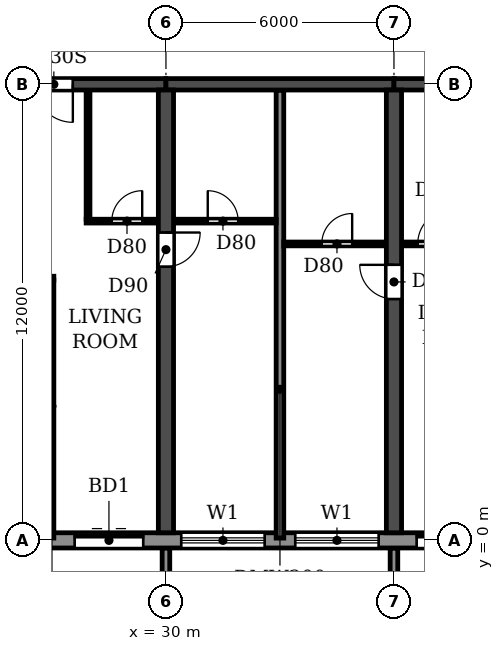
"""IFC4 building model, lengths in metres.
Left out: names, types, materials, properties, quantities, classifications, styles, units other than length and angle.
Written with IfcOpenShell. Run it as: python <this file> out.ifc"""

import sys

from ifc_helpers import new_model, si_unit, direction, frame, frame_2d, origin, place, context, subcontext, project, spatial, polyline, rectangle, outline, extrude, source, transform, mapped, element, fill, save


model = new_model("IFC4")
c1 = context("Model", 3, precision=1e-05, world=origin(), true_north=direction((0.0, 1.0)))
c2 = subcontext(c1, "Body", "Model", "MODEL_VIEW")
j1 = project(units=[si_unit("LENGTHUNIT", "METRE"), si_unit("PLANEANGLEUNIT", "RADIAN")], contexts=[c1])
p1 = place(None, origin())
s1 = spatial("IfcSite", under=j1, at=p1, CompositionType="ELEMENT")
p2 = place(p1, origin())
s2 = spatial("IfcBuilding", under=s1, at=p2, CompositionType="ELEMENT")
p3 = place(p2, frame((0.0, 0.0, 56.4)))
s3 = spatial("IfcBuildingStorey", under=s2, at=p3, CompositionType="ELEMENT", Elevation=56.4)
p4 = place(p3, frame((30.0, 0.2, 0.0), z_axis=(0.0, 0.0, 1.0), x_axis=(0.0, 1.0, 0.0)))
e1 = element("IfcWall", 1, at=p4, inside=s3, PredefinedType="SHEAR", context=c2, shape_type="SweptSolid", body=[
    extrude(rectangle(XDim=11.65, YDim=0.4, at=frame_2d((5.825, 0.0))), origin(), (0.0, 0.0, 1.0), 3.05),
])
p5 = place(p4, frame((7.0, 0.0, 0.0)))
e2 = element("IfcOpeningElement", 2, at=p5, cuts=e1, PredefinedType="OPENING", context=c2, shape_type="SweptSolid", body=[
    extrude(rectangle(XDim=0.9, YDim=2.1, at=frame_2d((0.45, 1.05))), frame((0.0, 0.21, 0.0), z_axis=(0.0, -1.0, 0.0), x_axis=(1.0, 0.0, 0.0)), (0.0, 0.0, 1.0), 0.42),
])
p6 = place(p3, frame((36.0, 0.2, 0.0), z_axis=(0.0, 0.0, 1.0), x_axis=(0.0, 1.0, 0.0)))
e3 = element("IfcWall", 3, at=p6, inside=s3, PredefinedType="SHEAR", context=c2, shape_type="SweptSolid", body=[
    extrude(rectangle(XDim=11.65, YDim=0.4, at=frame_2d((5.825, 0.0))), origin(), (0.0, 0.0, 1.0), 3.05),
])
p7 = place(p6, frame((6.15, 0.0, 0.0)))
e4 = element("IfcOpeningElement", 4, at=p7, cuts=e3, PredefinedType="OPENING", context=c2, shape_type="SweptSolid", body=[
    extrude(rectangle(XDim=0.9, YDim=2.1, at=frame_2d((0.45, 1.05))), frame((0.0, 0.21, 0.0), z_axis=(0.0, -1.0, 0.0), x_axis=(1.0, 0.0, 0.0)), (0.0, 0.0, 1.0), 0.42),
])
p8 = place(p3, frame((24.0, 12.0, 0.0), z_axis=(0.0, 0.0, 1.0), x_axis=(1.0, 0.0, 0.0)))
e5 = element("IfcWall", 5, at=p8, inside=s3, PredefinedType="SHEAR", context=c2, shape_type="SweptSolid", body=[
    extrude(rectangle(XDim=6.0, YDim=0.3, at=frame_2d((3.0, 0.0))), origin(), (0.0, 0.0, 1.0), 2.45),
])
p9 = place(p8, frame((2.55, 0.0, 0.0)))
e6 = element("IfcOpeningElement", 6, at=p9, cuts=e5, PredefinedType="OPENING", context=c2, shape_type="SweptSolid", body=[
    extrude(rectangle(XDim=1.0, YDim=2.1, at=frame_2d((0.5, 1.05))), frame((0.0, 0.16, 0.0), z_axis=(0.0, -1.0, 0.0), x_axis=(1.0, 0.0, 0.0)), (0.0, 0.0, 1.0), 0.32),
])
p10 = place(p3, frame((30.0, 12.0, 0.0), z_axis=(0.0, 0.0, 1.0), x_axis=(1.0, 0.0, 0.0)))
e7 = element("IfcWall", 7, at=p10, inside=s3, PredefinedType="SHEAR", context=c2, shape_type="SweptSolid", body=[
    extrude(rectangle(XDim=6.0, YDim=0.3, at=frame_2d((3.0, 0.0))), origin(), (0.0, 0.0, 1.0), 2.45),
])
p11 = place(p3, frame((36.0, 12.0, 0.0), z_axis=(0.0, 0.0, 1.0), x_axis=(1.0, 0.0, 0.0)))
e8 = element("IfcWall", 8, at=p11, inside=s3, PredefinedType="SHEAR", context=c2, shape_type="SweptSolid", body=[
    extrude(rectangle(XDim=6.0, YDim=0.3, at=frame_2d((3.0, 0.0))), origin(), (0.0, 0.0, 1.0), 2.45),
])
p12 = place(p11, frame((2.55, 0.0, 0.0)))
e9 = element("IfcOpeningElement", 9, at=p12, cuts=e8, PredefinedType="OPENING", context=c2, shape_type="SweptSolid", body=[
    extrude(rectangle(XDim=1.0, YDim=2.1, at=frame_2d((0.5, 1.05))), frame((0.0, 0.16, 0.0), z_axis=(0.0, -1.0, 0.0), x_axis=(1.0, 0.0, 0.0)), (0.0, 0.0, 1.0), 0.32),
])
p13 = place(p3, frame((10.683, 0.0, 0.0), z_axis=(0.0, 0.0, 1.0), x_axis=(1.0, 0.0, 0.0)))
e10 = element("IfcWall", 10, at=p13, inside=s3, PredefinedType="STANDARD", context=c2, shape_type="SweptSolid", body=[
    extrude(rectangle(XDim=80.634, YDim=0.4, at=frame_2d((40.317, 0.0))), origin(), (0.0, 0.0, 1.0), 3.05),
])
p14 = place(p13, frame((1.717, 0.0, 0.9)))
e11 = element("IfcOpeningElement", 11, at=p14, cuts=e10, PredefinedType="OPENING", context=c2, shape_type="SweptSolid", body=[
    extrude(rectangle(XDim=2.2, YDim=1.5, at=frame_2d((1.1, 0.75))), frame((0.0, 0.21, 0.0), z_axis=(0.0, -1.0, 0.0), x_axis=(1.0, 0.0, 0.0)), (0.0, 0.0, 1.0), 0.42),
])
p15 = place(p13, frame((4.917, 0.0, 0.0)))
e12 = element("IfcOpeningElement", 12, at=p15, cuts=e10, PredefinedType="OPENING", context=c2, shape_type="SweptSolid", body=[
    extrude(rectangle(XDim=1.8, YDim=2.4, at=frame_2d((0.9, 1.2))), frame((0.0, 0.21, 0.0), z_axis=(0.0, -1.0, 0.0), x_axis=(1.0, 0.0, 0.0)), (0.0, 0.0, 1.0), 0.42),
])
p16 = place(p13, frame((7.717, 0.0, 0.9)))
e13 = element("IfcOpeningElement", 13, at=p16, cuts=e10, PredefinedType="OPENING", context=c2, shape_type="SweptSolid", body=[
    extrude(rectangle(XDim=2.2, YDim=1.5, at=frame_2d((1.1, 0.75))), frame((0.0, 0.21, 0.0), z_axis=(0.0, -1.0, 0.0), x_axis=(1.0, 0.0, 0.0)), (0.0, 0.0, 1.0), 0.42),
])
p17 = place(p13, frame((10.717, 0.0, 0.9)))
e14 = element("IfcOpeningElement", 14, at=p17, cuts=e10, PredefinedType="OPENING", context=c2, shape_type="SweptSolid", body=[
    extrude(rectangle(XDim=2.2, YDim=1.5, at=frame_2d((1.1, 0.75))), frame((0.0, 0.21, 0.0), z_axis=(0.0, -1.0, 0.0), x_axis=(1.0, 0.0, 0.0)), (0.0, 0.0, 1.0), 0.42),
])
p18 = place(p13, frame((13.717, 0.0, 0.9)))
e15 = element("IfcOpeningElement", 15, at=p18, cuts=e10, PredefinedType="OPENING", context=c2, shape_type="SweptSolid", body=[
    extrude(rectangle(XDim=2.2, YDim=1.5, at=frame_2d((1.1, 0.75))), frame((0.0, 0.21, 0.0), z_axis=(0.0, -1.0, 0.0), x_axis=(1.0, 0.0, 0.0)), (0.0, 0.0, 1.0), 0.42),
])
p19 = place(p13, frame((16.917, 0.0, 0.0)))
e16 = element("IfcOpeningElement", 16, at=p19, cuts=e10, PredefinedType="OPENING", context=c2, shape_type="SweptSolid", body=[
    extrude(rectangle(XDim=1.8, YDim=2.4, at=frame_2d((0.9, 1.2))), frame((0.0, 0.21, 0.0), z_axis=(0.0, -1.0, 0.0), x_axis=(1.0, 0.0, 0.0)), (0.0, 0.0, 1.0), 0.42),
])
p20 = place(p13, frame((19.717, 0.0, 0.9)))
e17 = element("IfcOpeningElement", 17, at=p20, cuts=e10, PredefinedType="OPENING", context=c2, shape_type="SweptSolid", body=[
    extrude(rectangle(XDim=2.2, YDim=1.5, at=frame_2d((1.1, 0.75))), frame((0.0, 0.21, 0.0), z_axis=(0.0, -1.0, 0.0), x_axis=(1.0, 0.0, 0.0)), (0.0, 0.0, 1.0), 0.42),
])
p21 = place(p13, frame((22.717, 0.0, 0.9)))
e18 = element("IfcOpeningElement", 18, at=p21, cuts=e10, PredefinedType="OPENING", context=c2, shape_type="SweptSolid", body=[
    extrude(rectangle(XDim=2.2, YDim=1.5, at=frame_2d((1.1, 0.75))), frame((0.0, 0.21, 0.0), z_axis=(0.0, -1.0, 0.0), x_axis=(1.0, 0.0, 0.0)), (0.0, 0.0, 1.0), 0.42),
])
p22 = place(p13, frame((25.917, 0.0, 0.0)))
e19 = element("IfcOpeningElement", 19, at=p22, cuts=e10, PredefinedType="OPENING", context=c2, shape_type="SweptSolid", body=[
    extrude(rectangle(XDim=1.8, YDim=2.4, at=frame_2d((0.9, 1.2))), frame((0.0, 0.21, 0.0), z_axis=(0.0, -1.0, 0.0), x_axis=(1.0, 0.0, 0.0)), (0.0, 0.0, 1.0), 0.42),
])
p23 = place(p13, frame((28.717, 0.0, 0.9)))
e20 = element("IfcOpeningElement", 20, at=p23, cuts=e10, PredefinedType="OPENING", context=c2, shape_type="SweptSolid", body=[
    extrude(rectangle(XDim=2.2, YDim=1.5, at=frame_2d((1.1, 0.75))), frame((0.0, 0.21, 0.0), z_axis=(0.0, -1.0, 0.0), x_axis=(1.0, 0.0, 0.0)), (0.0, 0.0, 1.0), 0.42),
])
p24 = place(p13, frame((31.717, 0.0, 0.9)))
e21 = element("IfcOpeningElement", 21, at=p24, cuts=e10, PredefinedType="OPENING", context=c2, shape_type="SweptSolid", body=[
    extrude(rectangle(XDim=2.2, YDim=1.5, at=frame_2d((1.1, 0.75))), frame((0.0, 0.21, 0.0), z_axis=(0.0, -1.0, 0.0), x_axis=(1.0, 0.0, 0.0)), (0.0, 0.0, 1.0), 0.42),
])
p25 = place(p13, frame((34.717, 0.0, 0.9)))
e22 = element("IfcOpeningElement", 22, at=p25, cuts=e10, PredefinedType="OPENING", context=c2, shape_type="SweptSolid", body=[
    extrude(rectangle(XDim=2.2, YDim=1.5, at=frame_2d((1.1, 0.75))), frame((0.0, 0.21, 0.0), z_axis=(0.0, -1.0, 0.0), x_axis=(1.0, 0.0, 0.0)), (0.0, 0.0, 1.0), 0.42),
])
p26 = place(p13, frame((37.717, 0.0, 0.9)))
e23 = element("IfcOpeningElement", 23, at=p26, cuts=e10, PredefinedType="OPENING", context=c2, shape_type="SweptSolid", body=[
    extrude(rectangle(XDim=2.2, YDim=1.5, at=frame_2d((1.1, 0.75))), frame((0.0, 0.21, 0.0), z_axis=(0.0, -1.0, 0.0), x_axis=(1.0, 0.0, 0.0)), (0.0, 0.0, 1.0), 0.42),
])
p27 = place(p13, frame((40.917, 0.0, 0.0)))
e24 = element("IfcOpeningElement", 24, at=p27, cuts=e10, PredefinedType="OPENING", context=c2, shape_type="SweptSolid", body=[
    extrude(rectangle(XDim=1.8, YDim=2.4, at=frame_2d((0.9, 1.2))), frame((0.0, 0.21, 0.0), z_axis=(0.0, -1.0, 0.0), x_axis=(1.0, 0.0, 0.0)), (0.0, 0.0, 1.0), 0.42),
])
p28 = place(p13, frame((43.717, 0.0, 0.9)))
e25 = element("IfcOpeningElement", 25, at=p28, cuts=e10, PredefinedType="OPENING", context=c2, shape_type="SweptSolid", body=[
    extrude(rectangle(XDim=2.2, YDim=1.5, at=frame_2d((1.1, 0.75))), frame((0.0, 0.21, 0.0), z_axis=(0.0, -1.0, 0.0), x_axis=(1.0, 0.0, 0.0)), (0.0, 0.0, 1.0), 0.42),
])
p29 = place(p13, frame((46.717, 0.0, 0.9)))
e26 = element("IfcOpeningElement", 26, at=p29, cuts=e10, PredefinedType="OPENING", context=c2, shape_type="SweptSolid", body=[
    extrude(rectangle(XDim=2.2, YDim=1.5, at=frame_2d((1.1, 0.75))), frame((0.0, 0.21, 0.0), z_axis=(0.0, -1.0, 0.0), x_axis=(1.0, 0.0, 0.0)), (0.0, 0.0, 1.0), 0.42),
])
p30 = place(p13, frame((49.717, 0.0, 0.9)))
e27 = element("IfcOpeningElement", 27, at=p30, cuts=e10, PredefinedType="OPENING", context=c2, shape_type="SweptSolid", body=[
    extrude(rectangle(XDim=2.2, YDim=1.5, at=frame_2d((1.1, 0.75))), frame((0.0, 0.21, 0.0), z_axis=(0.0, -1.0, 0.0), x_axis=(1.0, 0.0, 0.0)), (0.0, 0.0, 1.0), 0.42),
])
p31 = place(p13, frame((52.717, 0.0, 0.9)))
e28 = element("IfcOpeningElement", 28, at=p31, cuts=e10, PredefinedType="OPENING", context=c2, shape_type="SweptSolid", body=[
    extrude(rectangle(XDim=2.2, YDim=1.5, at=frame_2d((1.1, 0.75))), frame((0.0, 0.21, 0.0), z_axis=(0.0, -1.0, 0.0), x_axis=(1.0, 0.0, 0.0)), (0.0, 0.0, 1.0), 0.42),
])
p32 = place(p13, frame((55.717, 0.0, 0.9)))
e29 = element("IfcOpeningElement", 29, at=p32, cuts=e10, PredefinedType="OPENING", context=c2, shape_type="SweptSolid", body=[
    extrude(rectangle(XDim=2.2, YDim=1.5, at=frame_2d((1.1, 0.75))), frame((0.0, 0.21, 0.0), z_axis=(0.0, -1.0, 0.0), x_axis=(1.0, 0.0, 0.0)), (0.0, 0.0, 1.0), 0.42),
])
p33 = place(p13, frame((58.717, 0.0, 0.9)))
e30 = element("IfcOpeningElement", 30, at=p33, cuts=e10, PredefinedType="OPENING", context=c2, shape_type="SweptSolid", body=[
    extrude(rectangle(XDim=2.2, YDim=1.5, at=frame_2d((1.1, 0.75))), frame((0.0, 0.21, 0.0), z_axis=(0.0, -1.0, 0.0), x_axis=(1.0, 0.0, 0.0)), (0.0, 0.0, 1.0), 0.42),
])
p34 = place(p13, frame((61.717, 0.0, 0.9)))
e31 = element("IfcOpeningElement", 31, at=p34, cuts=e10, PredefinedType="OPENING", context=c2, shape_type="SweptSolid", body=[
    extrude(rectangle(XDim=2.2, YDim=1.5, at=frame_2d((1.1, 0.75))), frame((0.0, 0.21, 0.0), z_axis=(0.0, -1.0, 0.0), x_axis=(1.0, 0.0, 0.0)), (0.0, 0.0, 1.0), 0.42),
])
p35 = place(p13, frame((64.917, 0.0, 0.0)))
e32 = element("IfcOpeningElement", 32, at=p35, cuts=e10, PredefinedType="OPENING", context=c2, shape_type="SweptSolid", body=[
    extrude(rectangle(XDim=1.8, YDim=2.4, at=frame_2d((0.9, 1.2))), frame((0.0, 0.21, 0.0), z_axis=(0.0, -1.0, 0.0), x_axis=(1.0, 0.0, 0.0)), (0.0, 0.0, 1.0), 0.42),
])
p36 = place(p13, frame((67.717, 0.0, 0.9)))
e33 = element("IfcOpeningElement", 33, at=p36, cuts=e10, PredefinedType="OPENING", context=c2, shape_type="SweptSolid", body=[
    extrude(rectangle(XDim=2.2, YDim=1.5, at=frame_2d((1.1, 0.75))), frame((0.0, 0.21, 0.0), z_axis=(0.0, -1.0, 0.0), x_axis=(1.0, 0.0, 0.0)), (0.0, 0.0, 1.0), 0.42),
])
p37 = place(p13, frame((70.717, 0.0, 0.9)))
e34 = element("IfcOpeningElement", 34, at=p37, cuts=e10, PredefinedType="OPENING", context=c2, shape_type="SweptSolid", body=[
    extrude(rectangle(XDim=2.2, YDim=1.5, at=frame_2d((1.1, 0.75))), frame((0.0, 0.21, 0.0), z_axis=(0.0, -1.0, 0.0), x_axis=(1.0, 0.0, 0.0)), (0.0, 0.0, 1.0), 0.42),
])
p38 = place(p13, frame((73.717, 0.0, 0.9)))
e35 = element("IfcOpeningElement", 35, at=p38, cuts=e10, PredefinedType="OPENING", context=c2, shape_type="SweptSolid", body=[
    extrude(rectangle(XDim=2.2, YDim=1.5, at=frame_2d((1.1, 0.75))), frame((0.0, 0.21, 0.0), z_axis=(0.0, -1.0, 0.0), x_axis=(1.0, 0.0, 0.0)), (0.0, 0.0, 1.0), 0.42),
])
p39 = place(p13, frame((76.917, 0.0, 0.0)))
e36 = element("IfcOpeningElement", 36, at=p39, cuts=e10, PredefinedType="OPENING", context=c2, shape_type="SweptSolid", body=[
    extrude(rectangle(XDim=1.8, YDim=2.4, at=frame_2d((0.9, 1.2))), frame((0.0, 0.21, 0.0), z_axis=(0.0, -1.0, 0.0), x_axis=(1.0, 0.0, 0.0)), (0.0, 0.0, 1.0), 0.42),
])
m1 = source(origin(), c2, "Body", "SweptSolid", [
    extrude(outline(polyline([(0.0, 0.0), (0.2, 0.0), (0.2, 1.65), (0.0, 1.65), (0.0, 0.0)])), origin(), (0.0, 0.0, 1.0), 3.1),
])
for number, where in (
    (37, (29.9, -1.85, 0.0)),
    (38, (35.9, -1.85, 0.0)),
):
    element("IfcWall", number, at=place(p3, frame(where)), inside=s3, PredefinedType="STANDARD", context=c2, shape_type="MappedRepresentation", body=[
        mapped(m1, transform((0.0, 0.0, 0.0))),
    ])
p40 = place(p3, frame((33.0, 0.06, 0.0), z_axis=(0.0, 0.0, 1.0), x_axis=(0.0, 1.0, 0.0)))
e39 = element("IfcWall", 39, at=p40, inside=s3, PredefinedType="PARTITIONING", context=c2, shape_type="SweptSolid", body=[
    extrude(rectangle(XDim=11.78, YDim=0.2, at=frame_2d((5.89, 0.0))), origin(), (0.0, 0.0, 1.0), 3.05),
])
p41 = place(p3, frame((24.21, 6.9, 0.0), z_axis=(0.0, 0.0, 1.0), x_axis=(1.0, 0.0, 0.0)))
e40 = element("IfcWall", 40, at=p41, inside=s3, PredefinedType="PARTITIONING", context=c2, shape_type="SweptSolid", body=[
    extrude(rectangle(XDim=2.84, YDim=0.1, at=frame_2d((1.42, 0.0))), origin(), (0.0, 0.0, 1.0), 3.05),
])
p42 = place(p41, frame((0.29, 0.0, 0.0)))
e41 = element("IfcOpeningElement", 41, at=p42, cuts=e40, PredefinedType="OPENING", context=c2, shape_type="SweptSolid", body=[
    extrude(rectangle(XDim=0.9, YDim=2.1, at=frame_2d((0.45, 1.05))), frame((0.0, 0.06, 0.0), z_axis=(0.0, -1.0, 0.0), x_axis=(1.0, 0.0, 0.0)), (0.0, 0.0, 1.0), 0.12),
])
p43 = place(p3, frame((33.1, 7.8, 0.0), z_axis=(0.0, 0.0, 1.0), x_axis=(1.0, 0.0, 0.0)))
e42 = element("IfcWall", 42, at=p43, inside=s3, PredefinedType="PARTITIONING", context=c2, shape_type="SweptSolid", body=[
    extrude(rectangle(XDim=2.69, YDim=0.1, at=frame_2d((1.345, 0.0))), origin(), (0.0, 0.0, 1.0), 3.05),
])
p44 = place(p43, frame((1.0, 0.0, 0.0)))
e43 = element("IfcOpeningElement", 43, at=p44, cuts=e42, PredefinedType="OPENING", context=c2, shape_type="SweptSolid", body=[
    extrude(rectangle(XDim=0.8, YDim=2.1, at=frame_2d((0.4, 1.05))), frame((0.0, 0.06, 0.0), z_axis=(0.0, -1.0, 0.0), x_axis=(1.0, 0.0, 0.0)), (0.0, 0.0, 1.0), 0.12),
])
p45 = place(p3, frame((36.21, 7.8, 0.0), z_axis=(0.0, 0.0, 1.0), x_axis=(1.0, 0.0, 0.0)))
e44 = element("IfcWall", 44, at=p45, inside=s3, PredefinedType="PARTITIONING", context=c2, shape_type="SweptSolid", body=[
    extrude(rectangle(XDim=1.99, YDim=0.1, at=frame_2d((0.995, 0.0))), origin(), (0.0, 0.0, 1.0), 3.05),
])
p46 = place(p45, frame((0.415, 0.0, 0.0)))
e45 = element("IfcOpeningElement", 45, at=p46, cuts=e44, PredefinedType="OPENING", context=c2, shape_type="SweptSolid", body=[
    extrude(rectangle(XDim=0.9, YDim=2.1, at=frame_2d((0.45, 1.05))), frame((0.0, 0.06, 0.0), z_axis=(0.0, -1.0, 0.0), x_axis=(1.0, 0.0, 0.0)), (0.0, 0.0, 1.0), 0.12),
])
p47 = place(p3, frame((27.9, 8.4, 0.0), z_axis=(0.0, 0.0, 1.0), x_axis=(1.0, 0.0, 0.0)))
e46 = element("IfcWall", 46, at=p47, inside=s3, PredefinedType="PARTITIONING", context=c2, shape_type="SweptSolid", body=[
    extrude(rectangle(XDim=1.89, YDim=0.1, at=frame_2d((0.945, 0.0))), origin(), (0.0, 0.0, 1.0), 3.05),
])
p48 = place(p47, frame((0.675, 0.0, 0.0)))
e47 = element("IfcOpeningElement", 47, at=p48, cuts=e46, PredefinedType="OPENING", context=c2, shape_type="SweptSolid", body=[
    extrude(rectangle(XDim=0.8, YDim=2.1, at=frame_2d((0.4, 1.05))), frame((0.0, 0.06, 0.0), z_axis=(0.0, -1.0, 0.0), x_axis=(1.0, 0.0, 0.0)), (0.0, 0.0, 1.0), 0.12),
])
p49 = place(p3, frame((30.21, 8.4, 0.0), z_axis=(0.0, 0.0, 1.0), x_axis=(1.0, 0.0, 0.0)))
e48 = element("IfcWall", 48, at=p49, inside=s3, PredefinedType="PARTITIONING", context=c2, shape_type="SweptSolid", body=[
    extrude(rectangle(XDim=2.69, YDim=0.1, at=frame_2d((1.345, 0.0))), origin(), (0.0, 0.0, 1.0), 3.05),
])
p50 = place(p49, frame((0.89, 0.0, 0.0)))
e49 = element("IfcOpeningElement", 49, at=p50, cuts=e48, PredefinedType="OPENING", context=c2, shape_type="SweptSolid", body=[
    extrude(rectangle(XDim=0.8, YDim=2.1, at=frame_2d((0.4, 1.05))), frame((0.0, 0.06, 0.0), z_axis=(0.0, -1.0, 0.0), x_axis=(1.0, 0.0, 0.0)), (0.0, 0.0, 1.0), 0.12),
])
p51 = place(p3, frame((27.0, 0.06, 0.0), z_axis=(0.0, 0.0, 1.0), x_axis=(0.0, 1.0, 0.0)))
e50 = element("IfcWall", 50, at=p51, inside=s3, PredefinedType="PARTITIONING", context=c2, shape_type="SweptSolid", body=[
    extrude(rectangle(XDim=6.79, YDim=0.1, at=frame_2d((3.395, 0.0))), origin(), (0.0, 0.0, 1.0), 3.05),
])
p52 = place(p3, frame((27.95, 8.45, 0.0), z_axis=(0.0, 0.0, 1.0), x_axis=(0.0, 1.0, 0.0)))
e51 = element("IfcWall", 51, at=p52, inside=s3, PredefinedType="PARTITIONING", context=c2, shape_type="SweptSolid", body=[
    extrude(rectangle(XDim=3.39, YDim=0.1, at=frame_2d((1.695, 0.0))), origin(), (0.0, 0.0, 1.0), 3.05),
])
p53 = place(p19, origin())
e52 = element("IfcDoor", 52, at=p53, inside=s3, OperationType="DOUBLE_DOOR_SLIDING", PredefinedType="DOOR", context=c2, shape_type="SweptSolid", body=[
    extrude(rectangle(XDim=1.8, YDim=2.4, at=frame_2d((0.9, 1.2))), frame((0.0, 0.025, 0.0), z_axis=(0.0, -1.0, 0.0), x_axis=(1.0, 0.0, 0.0)), (0.0, 0.0, 1.0), 0.05),
])
fill(e16, e52)
p54 = place(p20, origin())
e53 = element("IfcWindow", 53, at=p54, inside=s3, PartitioningType="DOUBLE_PANEL_HORIZONTAL", PredefinedType="WINDOW", context=c2, shape_type="SweptSolid", body=[
    extrude(rectangle(XDim=2.2, YDim=1.5, at=frame_2d((1.1, 0.75))), frame((0.0, 0.03, 0.0), z_axis=(0.0, -1.0, 0.0), x_axis=(1.0, 0.0, 0.0)), (0.0, 0.0, 1.0), 0.06),
])
fill(e17, e53)
p55 = place(p21, origin())
e54 = element("IfcWindow", 54, at=p55, inside=s3, PartitioningType="DOUBLE_PANEL_HORIZONTAL", PredefinedType="WINDOW", context=c2, shape_type="SweptSolid", body=[
    extrude(rectangle(XDim=2.2, YDim=1.5, at=frame_2d((1.1, 0.75))), frame((0.0, 0.03, 0.0), z_axis=(0.0, -1.0, 0.0), x_axis=(1.0, 0.0, 0.0)), (0.0, 0.0, 1.0), 0.06),
])
fill(e18, e54)
p56 = place(p22, origin())
e55 = element("IfcDoor", 55, at=p56, inside=s3, OperationType="DOUBLE_DOOR_SLIDING", PredefinedType="DOOR", context=c2, shape_type="SweptSolid", body=[
    extrude(rectangle(XDim=1.8, YDim=2.4, at=frame_2d((0.9, 1.2))), frame((0.0, 0.025, 0.0), z_axis=(0.0, -1.0, 0.0), x_axis=(1.0, 0.0, 0.0)), (0.0, 0.0, 1.0), 0.05),
])
fill(e19, e55)
p57 = place(p50, origin())
e56 = element("IfcDoor", 56, at=p57, inside=s3, OperationType="SINGLE_SWING_LEFT", PredefinedType="DOOR", context=c2, shape_type="SweptSolid", body=[
    extrude(rectangle(XDim=0.8, YDim=2.1, at=frame_2d((0.4, 1.05))), frame((0.0, 0.025, 0.0), z_axis=(0.0, -1.0, 0.0), x_axis=(1.0, 0.0, 0.0)), (0.0, 0.0, 1.0), 0.05),
])
fill(e49, e56)
p58 = place(p9, frame((1.0, 0.0, 0.0), z_axis=(0.0, 0.0, 1.0), x_axis=(-1.0, 0.0, 0.0)))
e57 = element("IfcDoor", 57, at=p58, inside=s3, OperationType="SINGLE_SWING_LEFT", PredefinedType="DOOR", context=c2, shape_type="SweptSolid", body=[
    extrude(rectangle(XDim=1.0, YDim=2.1, at=frame_2d((0.5, 1.05))), frame((0.0, 0.025, 0.0), z_axis=(0.0, -1.0, 0.0), x_axis=(1.0, 0.0, 0.0)), (0.0, 0.0, 1.0), 0.05),
])
fill(e6, e57)
p59 = place(p48, origin())
e58 = element("IfcDoor", 58, at=p59, inside=s3, OperationType="SINGLE_SWING_RIGHT", PredefinedType="DOOR", context=c2, shape_type="SweptSolid", body=[
    extrude(rectangle(XDim=0.8, YDim=2.1, at=frame_2d((0.4, 1.05))), frame((0.0, 0.025, 0.0), z_axis=(0.0, -1.0, 0.0), x_axis=(1.0, 0.0, 0.0)), (0.0, 0.0, 1.0), 0.05),
])
fill(e47, e58)
p60 = place(p5, frame((0.9, 0.0, 0.0), z_axis=(0.0, 0.0, 1.0), x_axis=(-1.0, 0.0, 0.0)))
e59 = element("IfcDoor", 59, at=p60, inside=s3, OperationType="SINGLE_SWING_LEFT", PredefinedType="DOOR", context=c2, shape_type="SweptSolid", body=[
    extrude(rectangle(XDim=0.9, YDim=2.1, at=frame_2d((0.45, 1.05))), frame((0.0, 0.025, 0.0), z_axis=(0.0, -1.0, 0.0), x_axis=(1.0, 0.0, 0.0)), (0.0, 0.0, 1.0), 0.05),
])
fill(e2, e59)
p61 = place(p44, origin())
e60 = element("IfcDoor", 60, at=p61, inside=s3, OperationType="SINGLE_SWING_RIGHT", PredefinedType="DOOR", context=c2, shape_type="SweptSolid", body=[
    extrude(rectangle(XDim=0.8, YDim=2.1, at=frame_2d((0.4, 1.05))), frame((0.0, 0.025, 0.0), z_axis=(0.0, -1.0, 0.0), x_axis=(1.0, 0.0, 0.0)), (0.0, 0.0, 1.0), 0.05),
])
fill(e43, e60)
p62 = place(p7, origin())
e61 = element("IfcDoor", 61, at=p62, inside=s3, OperationType="SINGLE_SWING_RIGHT", PredefinedType="DOOR", context=c2, shape_type="SweptSolid", body=[
    extrude(rectangle(XDim=0.9, YDim=2.1, at=frame_2d((0.45, 1.05))), frame((0.0, 0.025, 0.0), z_axis=(0.0, -1.0, 0.0), x_axis=(1.0, 0.0, 0.0)), (0.0, 0.0, 1.0), 0.05),
])
fill(e4, e61)
p63 = place(p46, origin())
e62 = element("IfcDoor", 62, at=p63, inside=s3, OperationType="SINGLE_SWING_RIGHT", PredefinedType="DOOR", context=c2, shape_type="SweptSolid", body=[
    extrude(rectangle(XDim=0.9, YDim=2.1, at=frame_2d((0.45, 1.05))), frame((0.0, 0.025, 0.0), z_axis=(0.0, -1.0, 0.0), x_axis=(1.0, 0.0, 0.0)), (0.0, 0.0, 1.0), 0.05),
])
fill(e45, e62)
save(model, sys.argv[1])
